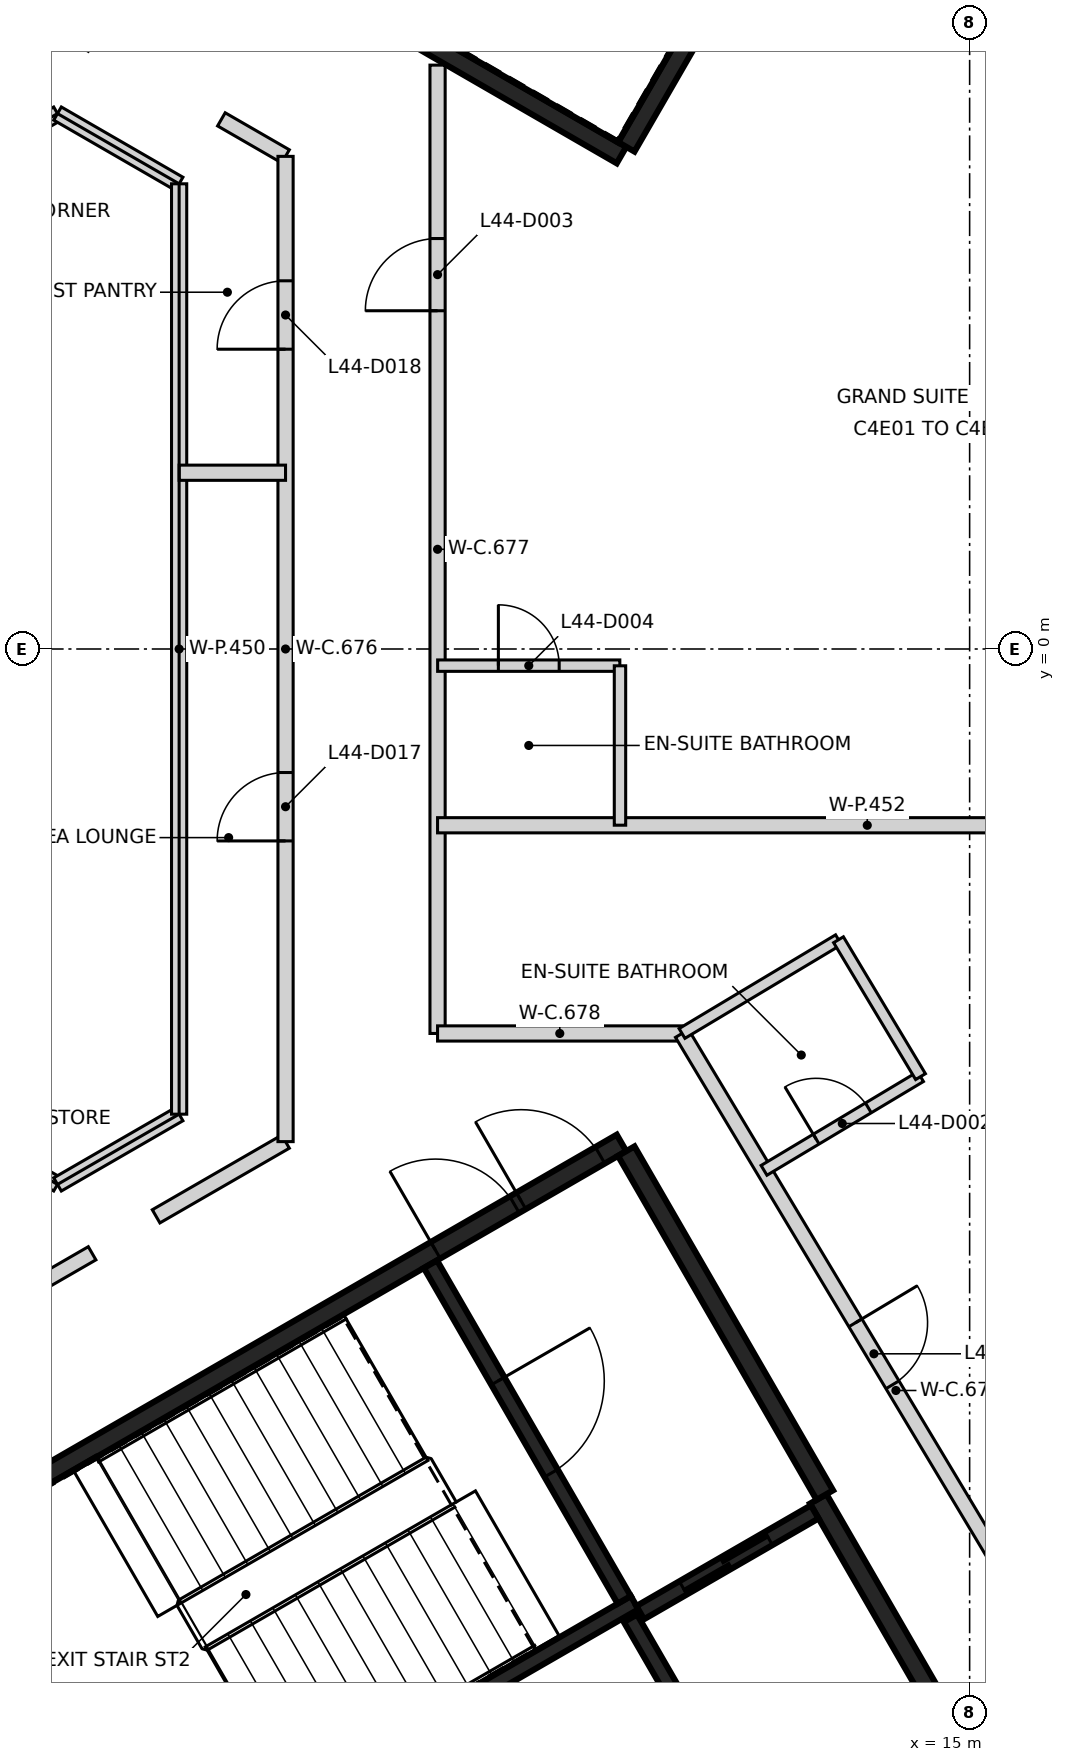
"""IFC4 building model, lengths in metres.
Left out: names, types, materials, properties, quantities, classifications, styles, units other than length and angle.
Written with IfcOpenShell. Run it as: python <this file> out.ifc"""

import sys

from ifc_helpers import new_model, si_unit, direction, frame, frame_2d, origin, place, context, subcontext, project, spatial, rectangle, extrude, element, fill, save


model = new_model("IFC4")
c1 = context("Model", 3, precision=1e-05, world=origin(), true_north=direction((0.0, 1.0)))
c2 = subcontext(c1, "Body", "Model", "MODEL_VIEW")
j1 = project(units=[si_unit("LENGTHUNIT", "METRE"), si_unit("PLANEANGLEUNIT", "RADIAN")], contexts=[c1])
p1 = place(None, origin())
s1 = spatial("IfcSite", under=j1, at=p1, CompositionType="ELEMENT")
p2 = place(p1, origin())
s2 = spatial("IfcBuilding", under=s1, at=p2, CompositionType="ELEMENT")
p3 = place(p2, frame((0.0, 0.0, 179.2)))
s3 = spatial("IfcBuildingStorey", under=s2, at=p3, CompositionType="ELEMENT", Elevation=179.2)
p4 = place(p3, frame((10.42, 6.498, 0.0), z_axis=(0.0, 0.0, 1.0), x_axis=(-0.866021906294, 0.500006057782, 0.0)))
e1 = element("IfcWall", 1, at=p4, inside=s3, PredefinedType="SHEAR", context=c2, shape_type="SweptSolid", body=[
    extrude(rectangle(XDim=11.55, YDim=0.25, at=frame_2d((5.775, 0.0))), origin(), (0.0, 0.0, 1.0), 3.25),
])
p5 = place(p4, frame((10.025, 0.0, 0.0)))
e2 = element("IfcOpeningElement", 2, at=p5, cuts=e1, PredefinedType="OPENING", context=c2, shape_type="SweptSolid", body=[
    extrude(rectangle(XDim=1.2, YDim=2.1, at=frame_2d((0.6, 1.05))), frame((0.0, 0.135, 0.0), z_axis=(0.0, -1.0, 0.0), x_axis=(1.0, 0.0, 0.0)), (0.0, 0.0, 1.0), 0.27),
])
p6 = place(p4, frame((8.725, 0.0, 0.0)))
e3 = element("IfcOpeningElement", 3, at=p6, cuts=e1, PredefinedType="OPENING", context=c2, shape_type="SweptSolid", body=[
    extrude(rectangle(XDim=1.2, YDim=2.1, at=frame_2d((0.6, 1.05))), frame((0.0, 0.135, 0.0), z_axis=(0.0, -1.0, 0.0), x_axis=(1.0, 0.0, 0.0)), (0.0, 0.0, 1.0), 0.27),
])
p7 = place(p3, frame((13.238, 11.378, 0.0), z_axis=(0.0, 0.0, 1.0), x_axis=(-0.500008851346, -0.866020293397, 0.0)))
e4 = element("IfcWall", 4, at=p7, inside=s3, PredefinedType="SHEAR", context=c2, shape_type="SweptSolid", body=[
    extrude(rectangle(XDim=5.51, YDim=0.25, at=frame_2d((2.755, 0.0))), origin(), (0.0, 0.0, 1.0), 3.25),
])
p8 = place(p3, frame((0.417, -12.273, 0.0), z_axis=(0.0, 0.0, 1.0), x_axis=(0.866021906294, 0.500006057782, 0.0)))
e5 = element("IfcWall", 5, at=p8, inside=s3, PredefinedType="SHEAR", context=c2, shape_type="SweptSolid", body=[
    extrude(rectangle(XDim=11.55, YDim=0.25, at=frame_2d((5.775, 0.0))), origin(), (0.0, 0.0, 1.0), 3.25),
])
p9 = place(p8, frame((10.025, 0.0, 0.0)))
e6 = element("IfcOpeningElement", 6, at=p9, cuts=e5, PredefinedType="OPENING", context=c2, shape_type="SweptSolid", body=[
    extrude(rectangle(XDim=1.2, YDim=2.1, at=frame_2d((0.6, 1.05))), frame((0.0, 0.135, 0.0), z_axis=(0.0, -1.0, 0.0), x_axis=(1.0, 0.0, 0.0)), (0.0, 0.0, 1.0), 0.27),
])
p10 = place(p8, frame((8.725, 0.0, 0.0)))
e7 = element("IfcOpeningElement", 7, at=p10, cuts=e5, PredefinedType="OPENING", context=c2, shape_type="SweptSolid", body=[
    extrude(rectangle(XDim=1.2, YDim=2.1, at=frame_2d((0.6, 1.05))), frame((0.0, 0.135, 0.0), z_axis=(0.0, -1.0, 0.0), x_axis=(1.0, 0.0, 0.0)), (0.0, 0.0, 1.0), 0.27),
])
p11 = place(p3, frame((13.008, -11.181, 0.0), z_axis=(0.0, 0.0, 1.0), x_axis=(0.500004234368, -0.866022959057, 0.0)))
e8 = element("IfcWall", 8, at=p11, inside=s3, PredefinedType="SHEAR", context=c2, shape_type="SweptSolid", body=[
    extrude(rectangle(XDim=6.25, YDim=0.25, at=frame_2d((3.125, 0.0))), origin(), (0.0, 0.0, 1.0), 3.25),
])
p12 = place(p11, frame((3.563, 0.0, 0.0)))
e9 = element("IfcOpeningElement", 9, at=p12, cuts=e8, PredefinedType="OPENING", context=c2, shape_type="SweptSolid", body=[
    extrude(rectangle(XDim=1.0, YDim=2.1, at=frame_2d((0.5, 1.05))), frame((0.0, 0.135, 0.0), z_axis=(0.0, -1.0, 0.0), x_axis=(1.0, 0.0, 0.0)), (0.0, 0.0, 1.0), 0.27),
])
p13 = place(p3, frame((3.235, -17.153, 0.0), z_axis=(0.0, 0.0, 1.0), x_axis=(-0.500008851346, 0.866020293397, 0.0)))
e10 = element("IfcWall", 10, at=p13, inside=s3, PredefinedType="SHEAR", context=c2, shape_type="SweptSolid", body=[
    extrude(rectangle(XDim=5.51, YDim=0.25, at=frame_2d((2.755, 0.0))), origin(), (0.0, 0.0, 1.0), 3.25),
])
p14 = place(p3, frame((10.483, -6.606, 0.0), z_axis=(0.0, 0.0, 1.0), x_axis=(0.49999885962, -0.866026062182, 0.0)))
e11 = element("IfcWall", 11, at=p14, inside=s3, PredefinedType="SHEAR", context=c2, shape_type="SweptSolid", body=[
    extrude(rectangle(XDim=5.225, YDim=0.25, at=frame_2d((2.612, 0.0))), origin(), (0.0, 0.0, 1.0), 3.25),
])
p15 = place(p3, frame((5.526, -15.472, 0.0), z_axis=(0.0, 0.0, 1.0), x_axis=(0.866041752167, 0.499971682701, 0.0)))
e12 = element("IfcWall", 12, at=p15, inside=s3, PredefinedType="SHEAR", context=c2, shape_type="SweptSolid", body=[
    extrude(rectangle(XDim=5.851, YDim=0.2, at=frame_2d((2.925, 0.0))), origin(), (0.0, 0.0, 1.0), 3.25),
])
p16 = place(p3, frame((7.906, -8.094, 0.0), z_axis=(0.0, 0.0, 1.0), x_axis=(0.500027839223, -0.866009330205, 0.0)))
e13 = element("IfcWall", 13, at=p16, inside=s3, PredefinedType="SHEAR", context=c2, shape_type="SweptSolid", body=[
    extrude(rectangle(XDim=5.098, YDim=0.2, at=frame_2d((2.549, 0.0))), origin(), (0.0, 0.0, 1.0), 3.25),
])
p17 = place(p16, frame((1.774, 0.0, 0.0)))
e14 = element("IfcOpeningElement", 14, at=p17, cuts=e13, PredefinedType="OPENING", context=c2, shape_type="SweptSolid", body=[
    extrude(rectangle(XDim=1.4, YDim=2.1, at=frame_2d((0.7, 1.05))), frame((0.0, 0.11, 0.0), z_axis=(0.0, -1.0, 0.0), x_axis=(1.0, 0.0, 0.0)), (0.0, 0.0, 1.0), 0.22),
])
p18 = place(p3, frame((12.088, -15.437, 0.0), z_axis=(0.0, 0.0, 1.0), x_axis=(-0.500026960575, 0.86600983753, 0.0)))
e15 = element("IfcWall", 15, at=p18, inside=s3, PredefinedType="SHEAR", context=c2, shape_type="SweptSolid", body=[
    extrude(rectangle(XDim=3.1, YDim=0.2, at=frame_2d((1.55, 0.0))), origin(), (0.0, 0.0, 1.0), 3.25),
])
p19 = place(p3, frame((10.666, -12.678, 0.0), z_axis=(0.0, 0.0, 1.0), x_axis=(0.866018407898, 0.500012117035, 0.0)))
e16 = element("IfcWall", 16, at=p19, inside=s3, PredefinedType="SHEAR", context=c2, shape_type="SweptSolid", body=[
    extrude(rectangle(XDim=2.651, YDim=0.2, at=frame_2d((1.325, 0.0))), origin(), (0.0, 0.0, 1.0), 3.25),
])
p20 = place(p19, frame((0.652, 0.0, 0.0)))
e17 = element("IfcOpeningElement", 17, at=p20, cuts=e16, PredefinedType="OPENING", context=c2, shape_type="SweptSolid", body=[
    extrude(rectangle(XDim=1.3, YDim=2.1, at=frame_2d((0.65, 1.05))), frame((0.0, 0.11, 0.0), z_axis=(0.0, -1.0, 0.0), x_axis=(1.0, 0.0, 0.0)), (0.0, 0.0, 1.0), 0.22),
])
p21 = place(p3, frame((2.612, -8.437, 0.0), z_axis=(0.0, 0.0, 1.0), x_axis=(0.866026830048, 0.499997529631, 0.0)))
e18 = element("IfcWall", 18, at=p21, inside=s3, PredefinedType="PARTITIONING", context=c2, shape_type="SweptSolid", body=[
    extrude(rectangle(XDim=0.973, YDim=0.2, at=frame_2d((0.487, 0.0))), origin(), (0.0, 0.0, 1.0), 3.25),
])
p22 = place(p3, frame((4.297, -7.464, 0.0), z_axis=(0.0, 0.0, 1.0), x_axis=(0.866026378386, 0.499998311937, 0.0)))
e19 = element("IfcWall", 19, at=p22, inside=s3, PredefinedType="PARTITIONING", context=c2, shape_type="SweptSolid", body=[
    extrude(rectangle(XDim=1.966, YDim=0.2, at=frame_2d((0.983, 0.0))), origin(), (0.0, 0.0, 1.0), 3.25),
])
p23 = place(p3, frame((5.156, 6.968, 0.0), z_axis=(0.0, 0.0, 1.0), x_axis=(0.866123013327, -0.49983089719, 0.0)))
e20 = element("IfcWall", 20, at=p23, inside=s3, PredefinedType="PARTITIONING", context=c2, shape_type="SweptSolid", body=[
    extrude(rectangle(XDim=0.974, YDim=0.2, at=frame_2d((0.487, 0.0))), origin(), (0.0, 0.0, 1.0), 3.25),
])
p24 = place(p3, frame((6.0, -6.481, 0.0), z_axis=(0.0, 0.0, 1.0), x_axis=(0.0, 1.0, 0.0)))
e21 = element("IfcWall", 21, at=p24, inside=s3, PredefinedType="PARTITIONING", context=c2, shape_type="SweptSolid", body=[
    extrude(rectangle(XDim=12.962, YDim=0.2, at=frame_2d((6.481, 0.0))), origin(), (0.0, 0.0, 1.0), 3.25),
])
p25 = place(p24, frame((3.956, 0.0, 0.0)))
e22 = element("IfcOpeningElement", 22, at=p25, cuts=e21, PredefinedType="OPENING", context=c2, shape_type="SweptSolid", body=[
    extrude(rectangle(XDim=0.9, YDim=2.1, at=frame_2d((0.45, 1.05))), frame((0.0, 0.11, 0.0), z_axis=(0.0, -1.0, 0.0), x_axis=(1.0, 0.0, 0.0)), (0.0, 0.0, 1.0), 0.22),
])
p26 = place(p24, frame((10.425, 0.0, 0.0)))
e23 = element("IfcOpeningElement", 23, at=p26, cuts=e21, PredefinedType="OPENING", context=c2, shape_type="SweptSolid", body=[
    extrude(rectangle(XDim=0.9, YDim=2.1, at=frame_2d((0.45, 1.05))), frame((0.0, 0.11, 0.0), z_axis=(0.0, -1.0, 0.0), x_axis=(1.0, 0.0, 0.0)), (0.0, 0.0, 1.0), 0.22),
])
p27 = place(p3, frame((8.0, -5.058, 0.0), z_axis=(0.0, 0.0, 1.0), x_axis=(0.0, 1.0, 0.0)))
e24 = element("IfcWall", 24, at=p27, inside=s3, PredefinedType="PARTITIONING", context=c2, shape_type="SweptSolid", body=[
    extrude(rectangle(XDim=12.74, YDim=0.2, at=frame_2d((6.37, 0.0))), origin(), (0.0, 0.0, 1.0), 3.25),
])
p28 = place(p27, frame((9.508, 0.0, 0.0)))
e25 = element("IfcOpeningElement", 25, at=p28, cuts=e24, PredefinedType="OPENING", context=c2, shape_type="SweptSolid", body=[
    extrude(rectangle(XDim=0.95, YDim=2.1, at=frame_2d((0.475, 1.05))), frame((0.0, 0.11, 0.0), z_axis=(0.0, -1.0, 0.0), x_axis=(1.0, 0.0, 0.0)), (0.0, 0.0, 1.0), 0.22),
])
p29 = place(p3, frame((8.0, -5.058, 0.0), z_axis=(0.0, 0.0, 1.0), x_axis=(1.0, 0.0, 0.0)))
e26 = element("IfcWall", 26, at=p29, inside=s3, PredefinedType="PARTITIONING", context=c2, shape_type="SweptSolid", body=[
    extrude(rectangle(XDim=3.216, YDim=0.2, at=frame_2d((1.608, 0.0))), origin(), (0.0, 0.0, 1.0), 3.25),
])
p30 = place(p3, frame((11.216, -5.058, 0.0), z_axis=(0.0, 0.0, 1.0), x_axis=(0.51393500197, -0.857829128527, 0.0)))
e27 = element("IfcWall", 27, at=p30, inside=s3, PredefinedType="PARTITIONING", context=c2, shape_type="SweptSolid", body=[
    extrude(rectangle(XDim=10.951, YDim=0.2, at=frame_2d((5.475, 0.0))), origin(), (0.0, 0.0, 1.0), 3.25),
])
p31 = place(p30, frame((4.438, 0.0, 0.0)))
e28 = element("IfcOpeningElement", 28, at=p31, cuts=e27, PredefinedType="OPENING", context=c2, shape_type="SweptSolid", body=[
    extrude(rectangle(XDim=0.95, YDim=2.1, at=frame_2d((0.475, 1.05))), frame((0.0, 0.11, 0.0), z_axis=(0.0, -1.0, 0.0), x_axis=(1.0, 0.0, 0.0)), (0.0, 0.0, 1.0), 0.22),
])
for number, where, z_axis, x_axis in (
    (29, (-7.6, 0.924, 0.0), (0.0, 0.0, 1.0), (0.866, 0.5, 0.0)),
    (30, (-7.6, -0.924, 0.0), (0.0, 0.0, 1.0), (0.866, -0.5, 0.0)),
):
    element("IfcWall", number, at=place(p3, frame(where, z_axis=z_axis, x_axis=x_axis)), inside=s3, PredefinedType="PARTITIONING", context=c2, shape_type="SweptSolid", body=[
        extrude(rectangle(XDim=12.24, YDim=0.2, at=frame_2d((6.12, 0.0))), origin(), (0.0, 0.0, 1.0), 3.25),
    ])
for number, where, z_axis, x_axis in (
    (31, (3.0, -7.044, 0.0), (0.0, 0.0, 1.0), (0.866, 0.5, 0.0)),
    (32, (3.0, 7.044, 0.0), (0.0, 0.0, 1.0), (0.866, -0.5, 0.0)),
):
    element("IfcWall", number, at=place(p3, frame(where, z_axis=z_axis, x_axis=x_axis)), inside=s3, PredefinedType="PARTITIONING", context=c2, shape_type="SweptSolid", body=[
        extrude(rectangle(XDim=1.848, YDim=0.2, at=frame_2d((0.924, 0.0))), origin(), (0.0, 0.0, 1.0), 3.25),
    ])
p32 = place(p3, frame((4.6, -6.12, 0.0), z_axis=(0.0, 0.0, 1.0), x_axis=(0.0, 1.0, 0.0)))
e33 = element("IfcWall", 33, at=p32, inside=s3, PredefinedType="PARTITIONING", context=c2, shape_type="SweptSolid", body=[
    extrude(rectangle(XDim=12.24, YDim=0.2, at=frame_2d((6.12, 0.0))), origin(), (0.0, 0.0, 1.0), 3.25),
])
p33 = place(p3, frame((4.6, 2.319, 0.0), z_axis=(0.0, 0.0, 1.0), x_axis=(1.0, 0.0, 0.0)))
e34 = element("IfcWall", 34, at=p33, inside=s3, PredefinedType="PARTITIONING", context=c2, shape_type="SweptSolid", body=[
    extrude(rectangle(XDim=1.4, YDim=0.2, at=frame_2d((0.7, 0.0))), origin(), (0.0, 0.0, 1.0), 3.25),
])
p34 = place(p3, frame((8.0, -2.319, 0.0), z_axis=(0.0, 0.0, 1.0), x_axis=(1.0, 0.0, 0.0)))
e35 = element("IfcWall", 35, at=p34, inside=s3, PredefinedType="PARTITIONING", context=c2, shape_type="SweptSolid", body=[
    extrude(rectangle(XDim=11.306, YDim=0.2, at=frame_2d((5.653, 0.0))), origin(), (0.0, 0.0, 1.0), 3.25),
])
p35 = place(p3, frame((8.001, -0.219, 0.0), z_axis=(0.0, 0.0, 1.0), x_axis=(1.0, 0.0, 0.0)))
e36 = element("IfcWall", 36, at=p35, inside=s3, PredefinedType="PARTITIONING", context=c2, shape_type="SweptSolid", body=[
    extrude(rectangle(XDim=2.397, YDim=0.15, at=frame_2d((1.198, 0.0))), origin(), (0.0, 0.0, 1.0), 3.25),
])
p36 = place(p35, frame((0.799, 0.0, 0.0)))
e37 = element("IfcOpeningElement", 37, at=p36, cuts=e36, PredefinedType="OPENING", context=c2, shape_type="SweptSolid", body=[
    extrude(rectangle(XDim=0.8, YDim=2.1, at=frame_2d((0.4, 1.05))), frame((0.0, 0.085, 0.0), z_axis=(0.0, -1.0, 0.0), x_axis=(1.0, 0.0, 0.0)), (0.0, 0.0, 1.0), 0.17),
])
p37 = place(p3, frame((10.4, -2.318, 0.0), z_axis=(0.0, 0.0, 1.0), x_axis=(0.0, 1.0, 0.0)))
e38 = element("IfcWall", 38, at=p37, inside=s3, PredefinedType="PARTITIONING", context=c2, shape_type="SweptSolid", body=[
    extrude(rectangle(XDim=2.097, YDim=0.15, at=frame_2d((1.049, 0.0))), origin(), (0.0, 0.0, 1.0), 3.25),
])
p38 = place(p3, frame((11.216, -5.058, 0.0), z_axis=(0.0, 0.0, 1.0), x_axis=(0.85788762415, 0.51383735202, 0.0)))
e39 = element("IfcWall", 39, at=p38, inside=s3, PredefinedType="PARTITIONING", context=c2, shape_type="SweptSolid", body=[
    extrude(rectangle(XDim=2.4, YDim=0.15, at=frame_2d((1.2, 0.0))), origin(), (0.0, 0.0, 1.0), 3.25),
])
p39 = place(p3, frame((12.295, -6.859, 0.0), z_axis=(0.0, 0.0, 1.0), x_axis=(0.857959316897, 0.513717636985, 0.0)))
e40 = element("IfcWall", 40, at=p39, inside=s3, PredefinedType="PARTITIONING", context=c2, shape_type="SweptSolid", body=[
    extrude(rectangle(XDim=2.4, YDim=0.15, at=frame_2d((1.2, 0.0))), origin(), (0.0, 0.0, 1.0), 3.25),
])
p40 = place(p39, frame((0.8, 0.0, 0.0)))
e41 = element("IfcOpeningElement", 41, at=p40, cuts=e40, PredefinedType="OPENING", context=c2, shape_type="SweptSolid", body=[
    extrude(rectangle(XDim=0.8, YDim=2.1, at=frame_2d((0.4, 1.05))), frame((0.0, 0.085, 0.0), z_axis=(0.0, -1.0, 0.0), x_axis=(1.0, 0.0, 0.0)), (0.0, 0.0, 1.0), 0.17),
])
p41 = place(p3, frame((13.275, -3.825, 0.0), z_axis=(0.0, 0.0, 1.0), x_axis=(0.513965548914, -0.857810826773, 0.0)))
e42 = element("IfcWall", 42, at=p41, inside=s3, PredefinedType="PARTITIONING", context=c2, shape_type="SweptSolid", body=[
    extrude(rectangle(XDim=2.1, YDim=0.15, at=frame_2d((1.05, 0.0))), origin(), (0.0, 0.0, 1.0), 3.25),
])
p42 = place(p20, origin())
e43 = element("IfcDoor", 43, at=p42, inside=s3, OperationType="SLIDING_TO_RIGHT", PredefinedType="DOOR", context=c2, shape_type="SweptSolid", body=[
    extrude(rectangle(XDim=1.3, YDim=2.1, at=frame_2d((0.65, 1.05))), frame((0.0, 0.025, 0.0), z_axis=(0.0, -1.0, 0.0), x_axis=(1.0, 0.0, 0.0)), (0.0, 0.0, 1.0), 0.05),
])
fill(e17, e43)
p43 = place(p9, origin())
e44 = element("IfcDoor", 44, at=p43, inside=s3, OperationType="SINGLE_SWING_LEFT", PredefinedType="DOOR", context=c2, shape_type="SweptSolid", body=[
    extrude(rectangle(XDim=1.2, YDim=2.1, at=frame_2d((0.6, 1.05))), frame((0.0, 0.025, 0.0), z_axis=(0.0, -1.0, 0.0), x_axis=(1.0, 0.0, 0.0)), (0.0, 0.0, 1.0), 0.05),
])
fill(e6, e44)
p44 = place(p10, origin())
e45 = element("IfcDoor", 45, at=p44, inside=s3, OperationType="SINGLE_SWING_RIGHT", PredefinedType="DOOR", context=c2, shape_type="SweptSolid", body=[
    extrude(rectangle(XDim=1.2, YDim=2.1, at=frame_2d((0.6, 1.05))), frame((0.0, 0.025, 0.0), z_axis=(0.0, -1.0, 0.0), x_axis=(1.0, 0.0, 0.0)), (0.0, 0.0, 1.0), 0.05),
])
fill(e7, e45)
p45 = place(p17, origin())
e46 = element("IfcDoor", 46, at=p45, inside=s3, OperationType="SINGLE_SWING_RIGHT", PredefinedType="DOOR", context=c2, shape_type="SweptSolid", body=[
    extrude(rectangle(XDim=1.4, YDim=2.1, at=frame_2d((0.7, 1.05))), frame((0.0, 0.025, 0.0), z_axis=(0.0, -1.0, 0.0), x_axis=(1.0, 0.0, 0.0)), (0.0, 0.0, 1.0), 0.05),
])
fill(e14, e46)
p46 = place(p31, origin())
e47 = element("IfcDoor", 47, at=p46, inside=s3, OperationType="SINGLE_SWING_LEFT", PredefinedType="DOOR", context=c2, shape_type="SweptSolid", body=[
    extrude(rectangle(XDim=0.95, YDim=2.1, at=frame_2d((0.475, 1.05))), frame((0.0, 0.025, 0.0), z_axis=(0.0, -1.0, 0.0), x_axis=(1.0, 0.0, 0.0)), (0.0, 0.0, 1.0), 0.05),
])
fill(e28, e47)
p47 = place(p40, frame((0.8, 0.0, 0.0), z_axis=(0.0, 0.0, 1.0), x_axis=(-1.0, 0.0, 0.0)))
e48 = element("IfcDoor", 48, at=p47, inside=s3, OperationType="SINGLE_SWING_LEFT", PredefinedType="DOOR", context=c2, shape_type="SweptSolid", body=[
    extrude(rectangle(XDim=0.8, YDim=2.1, at=frame_2d((0.4, 1.05))), frame((0.0, 0.025, 0.0), z_axis=(0.0, -1.0, 0.0), x_axis=(1.0, 0.0, 0.0)), (0.0, 0.0, 1.0), 0.05),
])
fill(e41, e48)
p48 = place(p28, frame((0.95, 0.0, 0.0), z_axis=(0.0, 0.0, 1.0), x_axis=(-1.0, 0.0, 0.0)))
e49 = element("IfcDoor", 49, at=p48, inside=s3, OperationType="SINGLE_SWING_LEFT", PredefinedType="DOOR", context=c2, shape_type="SweptSolid", body=[
    extrude(rectangle(XDim=0.95, YDim=2.1, at=frame_2d((0.475, 1.05))), frame((0.0, 0.025, 0.0), z_axis=(0.0, -1.0, 0.0), x_axis=(1.0, 0.0, 0.0)), (0.0, 0.0, 1.0), 0.05),
])
fill(e25, e49)
p49 = place(p36, origin())
e50 = element("IfcDoor", 50, at=p49, inside=s3, OperationType="SINGLE_SWING_LEFT", PredefinedType="DOOR", context=c2, shape_type="SweptSolid", body=[
    extrude(rectangle(XDim=0.8, YDim=2.1, at=frame_2d((0.4, 1.05))), frame((0.0, 0.025, 0.0), z_axis=(0.0, -1.0, 0.0), x_axis=(1.0, 0.0, 0.0)), (0.0, 0.0, 1.0), 0.05),
])
fill(e37, e50)
p50 = place(p25, origin())
e51 = element("IfcDoor", 51, at=p50, inside=s3, OperationType="SINGLE_SWING_LEFT", PredefinedType="DOOR", context=c2, shape_type="SweptSolid", body=[
    extrude(rectangle(XDim=0.9, YDim=2.1, at=frame_2d((0.45, 1.05))), frame((0.0, 0.025, 0.0), z_axis=(0.0, -1.0, 0.0), x_axis=(1.0, 0.0, 0.0)), (0.0, 0.0, 1.0), 0.05),
])
fill(e22, e51)
p51 = place(p26, origin())
e52 = element("IfcDoor", 52, at=p51, inside=s3, OperationType="SINGLE_SWING_LEFT", PredefinedType="DOOR", context=c2, shape_type="SweptSolid", body=[
    extrude(rectangle(XDim=0.9, YDim=2.1, at=frame_2d((0.45, 1.05))), frame((0.0, 0.025, 0.0), z_axis=(0.0, -1.0, 0.0), x_axis=(1.0, 0.0, 0.0)), (0.0, 0.0, 1.0), 0.05),
])
fill(e23, e52)
save(model, sys.argv[1])
